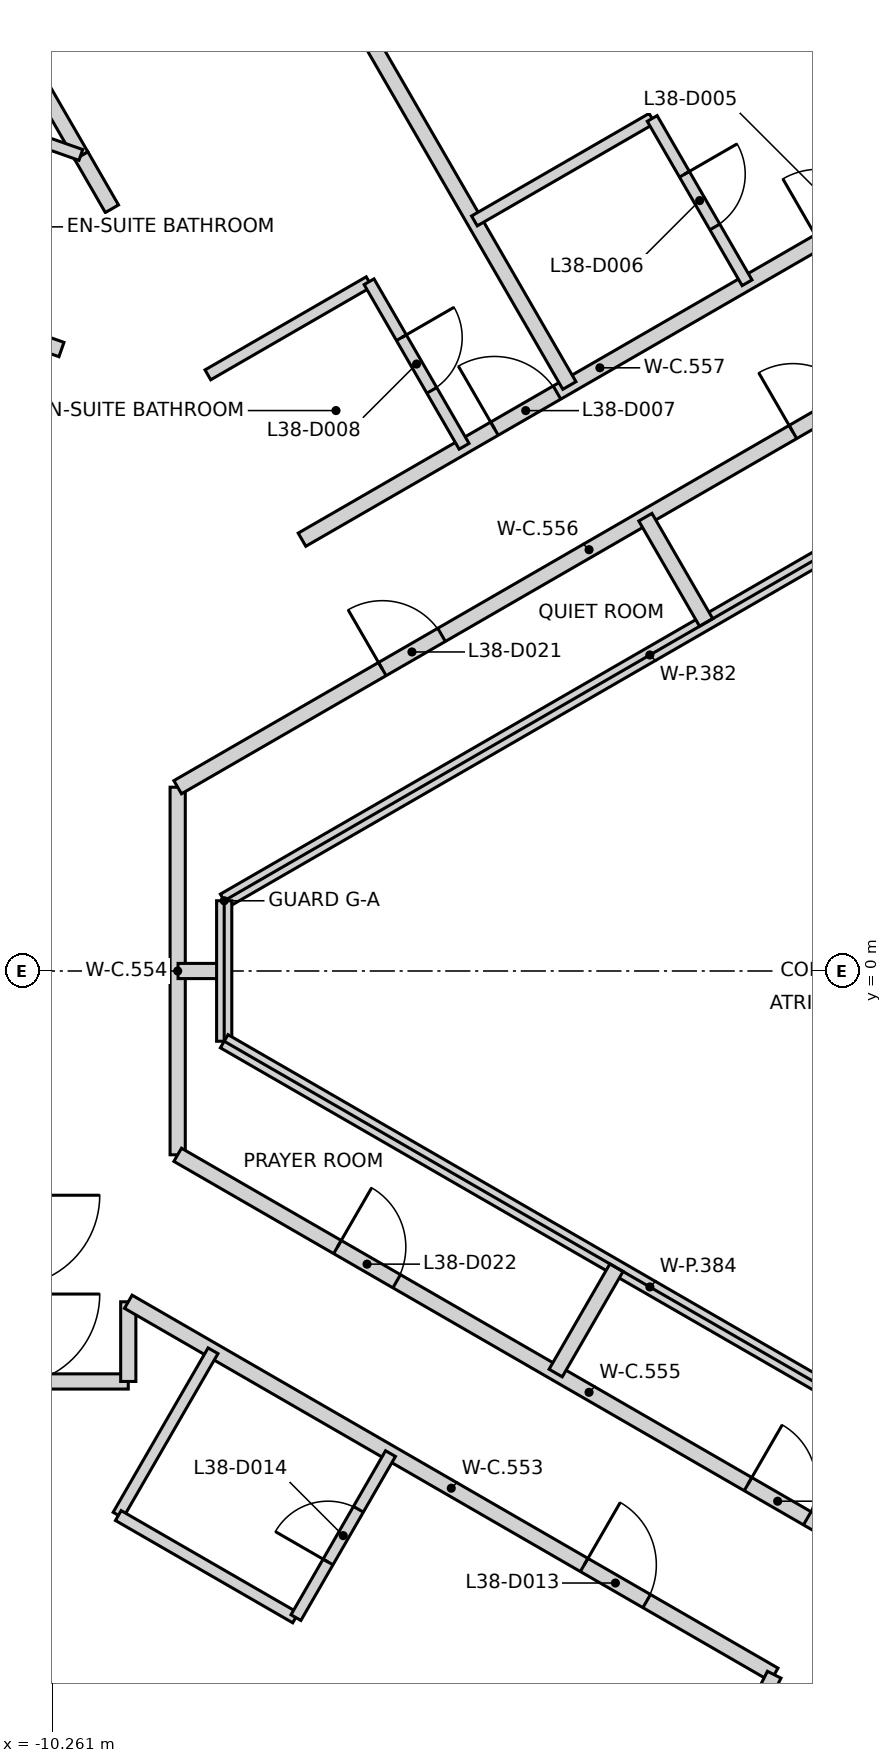
"""IFC4 building model, lengths in metres.
Left out: names, types, materials, properties, quantities, classifications, styles, units other than length and angle.
Written with IfcOpenShell. Run it as: python <this file> out.ifc"""

import sys

from ifc_helpers import new_model, si_unit, direction, frame, frame_2d, origin, place, context, subcontext, project, spatial, rectangle, extrude, element, fill, save


model = new_model("IFC4")
c1 = context("Model", 3, precision=1e-05, world=origin(), true_north=direction((0.0, 1.0)))
c2 = subcontext(c1, "Body", "Model", "MODEL_VIEW")
j1 = project(units=[si_unit("LENGTHUNIT", "METRE"), si_unit("PLANEANGLEUNIT", "RADIAN")], contexts=[c1])
p1 = place(None, origin())
s1 = spatial("IfcSite", under=j1, at=p1, CompositionType="ELEMENT")
p2 = place(p1, origin())
s2 = spatial("IfcBuilding", under=s1, at=p2, CompositionType="ELEMENT")
p3 = place(p2, frame((0.0, 0.0, 154.0)))
s3 = spatial("IfcBuildingStorey", under=s2, at=p3, CompositionType="ELEMENT", Elevation=154.0)
p4 = place(p3, frame((-16.026, 10.246, 0.0), z_axis=(0.0, 0.0, 1.0), x_axis=(0.943337348352, -0.331835271187, 0.0)))
e1 = element("IfcWall", 1, at=p4, inside=s3, PredefinedType="PARTITIONING", context=c2, shape_type="SweptSolid", body=[
    extrude(rectangle(XDim=6.238, YDim=0.2, at=frame_2d((3.119, 0.0))), origin(), (0.0, 0.0, 1.0), 3.2),
])
p5 = place(p4, frame((0.2, 0.0, 0.0)))
e2 = element("IfcOpeningElement", 2, at=p5, cuts=e1, PredefinedType="OPENING", context=c2, shape_type="SweptSolid", body=[
    extrude(rectangle(XDim=0.95, YDim=2.1, at=frame_2d((0.475, 1.05))), frame((0.0, 0.11, 0.0), z_axis=(0.0, -1.0, 0.0), x_axis=(1.0, 0.0, 0.0)), (0.0, 0.0, 1.0), 0.22),
])
p6 = place(p3, frame((-10.652, -5.4, 0.0), z_axis=(0.0, 0.0, 1.0), x_axis=(1.0, 0.0, 0.0)))
e3 = element("IfcWall", 3, at=p6, inside=s3, PredefinedType="PARTITIONING", context=c2, shape_type="SweptSolid", body=[
    extrude(rectangle(XDim=1.39, YDim=0.2, at=frame_2d((0.695, 0.0))), origin(), (0.0, 0.0, 1.0), 3.2),
])
p7 = place(p3, frame((-9.262, -5.4, 0.0), z_axis=(0.0, 0.0, 1.0), x_axis=(0.0, 1.0, 0.0)))
e4 = element("IfcWall", 4, at=p7, inside=s3, PredefinedType="PARTITIONING", context=c2, shape_type="SweptSolid", body=[
    extrude(rectangle(XDim=1.048, YDim=0.2, at=frame_2d((0.524, 0.0))), origin(), (0.0, 0.0, 1.0), 3.2),
])
p8 = place(p3, frame((-9.261, -4.351, 0.0), z_axis=(0.0, 0.0, 1.0), x_axis=(0.865985037707, -0.500069909581, 0.0)))
e5 = element("IfcWall", 5, at=p8, inside=s3, PredefinedType="PARTITIONING", context=c2, shape_type="SweptSolid", body=[
    extrude(rectangle(XDim=9.812, YDim=0.2, at=frame_2d((4.906, 0.0))), origin(), (0.0, 0.0, 1.0), 3.2),
])
p9 = place(p8, frame((6.925, 0.0, 0.0)))
e6 = element("IfcOpeningElement", 6, at=p9, cuts=e5, PredefinedType="OPENING", context=c2, shape_type="SweptSolid", body=[
    extrude(rectangle(XDim=0.95, YDim=2.1, at=frame_2d((0.475, 1.05))), frame((0.0, 0.11, 0.0), z_axis=(0.0, -1.0, 0.0), x_axis=(1.0, 0.0, 0.0)), (0.0, 0.0, 1.0), 0.22),
])
p10 = place(p3, frame((-8.612, -2.418, 0.0), z_axis=(0.0, 0.0, 1.0), x_axis=(0.0, 1.0, 0.0)))
e7 = element("IfcWall", 7, at=p10, inside=s3, PredefinedType="PARTITIONING", context=c2, shape_type="SweptSolid", body=[
    extrude(rectangle(XDim=4.836, YDim=0.2, at=frame_2d((2.418, 0.0))), origin(), (0.0, 0.0, 1.0), 2.3),
])
p11 = place(p3, frame((-8.612, -2.418, 0.0), z_axis=(0.0, 0.0, 1.0), x_axis=(0.866023916678, -0.500002575735, 0.0)))
e8 = element("IfcWall", 8, at=p11, inside=s3, PredefinedType="PARTITIONING", context=c2, shape_type="SweptSolid", body=[
    extrude(rectangle(XDim=12.499, YDim=0.2, at=frame_2d((6.249, 0.0))), origin(), (0.0, 0.0, 1.0), 3.2),
])
p12 = place(p11, frame((2.427, 0.0, 0.0)))
e9 = element("IfcOpeningElement", 9, at=p12, cuts=e8, PredefinedType="OPENING", context=c2, shape_type="SweptSolid", body=[
    extrude(rectangle(XDim=0.9, YDim=2.1, at=frame_2d((0.45, 1.05))), frame((0.0, 0.11, 0.0), z_axis=(0.0, -1.0, 0.0), x_axis=(1.0, 0.0, 0.0)), (0.0, 0.0, 1.0), 0.22),
])
p13 = place(p11, frame((8.665, 0.0, 0.0)))
e10 = element("IfcOpeningElement", 10, at=p13, cuts=e8, PredefinedType="OPENING", context=c2, shape_type="SweptSolid", body=[
    extrude(rectangle(XDim=0.9, YDim=2.1, at=frame_2d((0.45, 1.05))), frame((0.0, 0.11, 0.0), z_axis=(0.0, -1.0, 0.0), x_axis=(1.0, 0.0, 0.0)), (0.0, 0.0, 1.0), 0.22),
])
p14 = place(p3, frame((-8.612, 2.418, 0.0), z_axis=(0.0, 0.0, 1.0), x_axis=(0.866019033094, 0.500011034197, 0.0)))
e11 = element("IfcWall", 11, at=p14, inside=s3, PredefinedType="PARTITIONING", context=c2, shape_type="SweptSolid", body=[
    extrude(rectangle(XDim=12.498, YDim=0.2, at=frame_2d((6.249, 0.0))), origin(), (0.0, 0.0, 1.0), 3.2),
])
p15 = place(p14, frame((9.346, 0.0, 0.0)))
e12 = element("IfcOpeningElement", 12, at=p15, cuts=e11, PredefinedType="OPENING", context=c2, shape_type="SweptSolid", body=[
    extrude(rectangle(XDim=0.9, YDim=2.1, at=frame_2d((0.45, 1.05))), frame((0.0, 0.11, 0.0), z_axis=(0.0, -1.0, 0.0), x_axis=(1.0, 0.0, 0.0)), (0.0, 0.0, 1.0), 0.22),
])
p16 = place(p14, frame((3.109, 0.0, 0.0)))
e13 = element("IfcOpeningElement", 13, at=p16, cuts=e11, PredefinedType="OPENING", context=c2, shape_type="SweptSolid", body=[
    extrude(rectangle(XDim=0.9, YDim=2.1, at=frame_2d((0.45, 1.05))), frame((0.0, 0.11, 0.0), z_axis=(0.0, -1.0, 0.0), x_axis=(1.0, 0.0, 0.0)), (0.0, 0.0, 1.0), 0.22),
])
p17 = place(p3, frame((-6.976, 5.674, 0.0), z_axis=(0.0, 0.0, 1.0), x_axis=(0.8661469583, 0.499789402276, 0.0)))
e14 = element("IfcWall", 14, at=p17, inside=s3, PredefinedType="PARTITIONING", context=c2, shape_type="SweptSolid", body=[
    extrude(rectangle(XDim=9.05, YDim=0.2, at=frame_2d((4.525, 0.0))), origin(), (0.0, 0.0, 1.0), 3.2),
])
p18 = place(p17, frame((7.852, 0.0, 0.0)))
e15 = element("IfcOpeningElement", 15, at=p18, cuts=e14, PredefinedType="OPENING", context=c2, shape_type="SweptSolid", body=[
    extrude(rectangle(XDim=0.95, YDim=2.1, at=frame_2d((0.475, 1.05))), frame((0.0, 0.11, 0.0), z_axis=(0.0, -1.0, 0.0), x_axis=(1.0, 0.0, 0.0)), (0.0, 0.0, 1.0), 0.22),
])
p19 = place(p17, frame((2.923, 0.0, 0.0)))
e16 = element("IfcOpeningElement", 16, at=p19, cuts=e14, PredefinedType="OPENING", context=c2, shape_type="SweptSolid", body=[
    extrude(rectangle(XDim=0.95, YDim=2.1, at=frame_2d((0.475, 1.05))), frame((0.0, 0.11, 0.0), z_axis=(0.0, -1.0, 0.0), x_axis=(1.0, 0.0, 0.0)), (0.0, 0.0, 1.0), 0.22),
])
p20 = place(p3, frame((-2.162, -12.041, 0.0), z_axis=(0.0, 0.0, 1.0), x_axis=(0.448937335771, 0.893563242614, 0.0)))
e17 = element("IfcWall", 17, at=p20, inside=s3, PredefinedType="PARTITIONING", context=c2, shape_type="SweptSolid", body=[
    extrude(rectangle(XDim=3.115, YDim=0.2, at=frame_2d((1.557, 0.0))), origin(), (0.0, 0.0, 1.0), 3.2),
])
p21 = place(p3, frame((-13.573, 17.122, 0.0), z_axis=(0.0, 0.0, 1.0), x_axis=(0.49998952864, -0.866031449343, 0.0)))
e18 = element("IfcWall", 18, at=p21, inside=s3, PredefinedType="PARTITIONING", context=c2, shape_type="SweptSolid", body=[
    extrude(rectangle(XDim=7.385, YDim=0.2, at=frame_2d((3.693, 0.0))), origin(), (0.0, 0.0, 1.0), 2.3),
])
p22 = place(p3, frame((-10.071, 19.158, 0.0), z_axis=(0.0, 0.0, 1.0), x_axis=(0.499905140254, -0.866080164158, 0.0)))
e19 = element("IfcWall", 19, at=p22, inside=s3, PredefinedType="PARTITIONING", context=c2, shape_type="SweptSolid", body=[
    extrude(rectangle(XDim=13.227, YDim=0.2, at=frame_2d((6.613, 0.0))), origin(), (0.0, 0.0, 1.0), 2.3),
])
p23 = place(p3, frame((-9.88, 10.726, 0.0), z_axis=(0.0, 0.0, 1.0), x_axis=(0.499626274598, -0.866241066754, 0.0)))
e20 = element("IfcWall", 20, at=p23, inside=s3, PredefinedType="PARTITIONING", context=c2, shape_type="SweptSolid", body=[
    extrude(rectangle(XDim=0.806, YDim=0.2, at=frame_2d((0.403, 0.0))), origin(), (0.0, 0.0, 1.0), 3.2),
])
p24 = place(p3, frame((-8.607, 0.0, 0.0), z_axis=(0.0, 0.0, 1.0), x_axis=(1.0, 0.0, 0.0)))
e21 = element("IfcWall", 21, at=p24, inside=s3, PredefinedType="PARTITIONING", context=c2, shape_type="SweptSolid", body=[
    extrude(rectangle(XDim=0.607, YDim=0.2, at=frame_2d((0.303, 0.0))), origin(), (0.0, 0.0, 1.0), 2.3),
])
p25 = place(p3, frame((-8.0, 0.925, 0.0), z_axis=(0.0, 0.0, 1.0), x_axis=(0.866075250037, 0.499913653818, 0.0)))
e22 = element("IfcWall", 22, at=p25, inside=s3, PredefinedType="PARTITIONING", context=c2, shape_type="SweptSolid", body=[
    extrude(rectangle(XDim=12.932, YDim=0.2, at=frame_2d((6.466, 0.0))), origin(), (0.0, 0.0, 1.0), 2.3),
])
p26 = place(p3, frame((-8.0, -0.924, 0.0), z_axis=(0.0, 0.0, 1.0), x_axis=(0.0, 1.0, 0.0)))
e23 = element("IfcWall", 23, at=p26, inside=s3, PredefinedType="PARTITIONING", context=c2, shape_type="SweptSolid", body=[
    extrude(rectangle(XDim=1.848, YDim=0.2, at=frame_2d((0.924, 0.0))), origin(), (0.0, 0.0, 1.0), 2.3),
])
p27 = place(p3, frame((-8.0, -0.924, 0.0), z_axis=(0.0, 0.0, 1.0), x_axis=(0.866062358179, -0.499935987647, 0.0)))
e24 = element("IfcWall", 24, at=p27, inside=s3, PredefinedType="PARTITIONING", context=c2, shape_type="SweptSolid", body=[
    extrude(rectangle(XDim=12.932, YDim=0.2, at=frame_2d((6.466, 0.0))), origin(), (0.0, 0.0, 1.0), 2.3),
])
p28 = place(p3, frame((-3.639, -5.289, 0.0), z_axis=(0.0, 0.0, 1.0), x_axis=(0.49981490623, 0.866132241352, 0.0)))
e25 = element("IfcWall", 25, at=p28, inside=s3, PredefinedType="PARTITIONING", context=c2, shape_type="SweptSolid", body=[
    extrude(rectangle(XDim=1.6, YDim=0.2, at=frame_2d((0.8, 0.0))), origin(), (0.0, 0.0, 1.0), 2.3),
])
p29 = place(p3, frame((-2.459, 5.97, 0.0), z_axis=(0.0, 0.0, 1.0), x_axis=(0.499898632315, -0.866083920535, 0.0)))
e26 = element("IfcWall", 26, at=p29, inside=s3, PredefinedType="PARTITIONING", context=c2, shape_type="SweptSolid", body=[
    extrude(rectangle(XDim=1.599, YDim=0.2, at=frame_2d((0.8, 0.0))), origin(), (0.0, 0.0, 1.0), 3.2),
])
p30 = place(p3, frame((-11.858, 11.431, 0.0), z_axis=(0.0, 0.0, 1.0), x_axis=(0.943162669368, -0.332331429617, 0.0)))
e27 = element("IfcWall", 27, at=p30, inside=s3, PredefinedType="PARTITIONING", context=c2, shape_type="SweptSolid", body=[
    extrude(rectangle(XDim=2.091, YDim=0.15, at=frame_2d((1.045, 0.0))), origin(), (0.0, 0.0, 1.0), 3.2),
])
p31 = place(p3, frame((-9.396, -7.159, 0.0), z_axis=(0.0, 0.0, 1.0), x_axis=(0.500091929049, 0.865972322018, 0.0)))
e28 = element("IfcWall", 28, at=p31, inside=s3, PredefinedType="PARTITIONING", context=c2, shape_type="SweptSolid", body=[
    extrude(rectangle(XDim=2.498, YDim=0.15, at=frame_2d((1.249, 0.0))), origin(), (0.0, 0.0, 1.0), 3.2),
])
p32 = place(p3, frame((-9.393, -7.164, 0.0), z_axis=(0.0, 0.0, 1.0), x_axis=(0.866098020528, -0.499874203012, 0.0)))
e29 = element("IfcWall", 29, at=p32, inside=s3, PredefinedType="PARTITIONING", context=c2, shape_type="SweptSolid", body=[
    extrude(rectangle(XDim=2.693, YDim=0.15, at=frame_2d((1.346, 0.0))), origin(), (0.0, 0.0, 1.0), 3.2),
])
p33 = place(p3, frame((-8.215, 7.843, 0.0), z_axis=(0.0, 0.0, 1.0), x_axis=(0.865983065851, 0.500073324283, 0.0)))
e30 = element("IfcWall", 30, at=p33, inside=s3, PredefinedType="PARTITIONING", context=c2, shape_type="SweptSolid", body=[
    extrude(rectangle(XDim=2.449, YDim=0.15, at=frame_2d((1.225, 0.0))), origin(), (0.0, 0.0, 1.0), 3.2),
])
p34 = place(p3, frame((-7.056, -8.507, 0.0), z_axis=(0.0, 0.0, 1.0), x_axis=(0.499397145068, 0.866373182582, 0.0)))
e31 = element("IfcWall", 31, at=p34, inside=s3, PredefinedType="PARTITIONING", context=c2, shape_type="SweptSolid", body=[
    extrude(rectangle(XDim=2.491, YDim=0.15, at=frame_2d((1.245, 0.0))), origin(), (0.0, 0.0, 1.0), 3.2),
])
p35 = place(p34, frame((0.845, 0.0, 0.0)))
e32 = element("IfcOpeningElement", 32, at=p35, cuts=e31, PredefinedType="OPENING", context=c2, shape_type="SweptSolid", body=[
    extrude(rectangle(XDim=0.8, YDim=2.1, at=frame_2d((0.4, 1.05))), frame((0.0, 0.085, 0.0), z_axis=(0.0, -1.0, 0.0), x_axis=(1.0, 0.0, 0.0)), (0.0, 0.0, 1.0), 0.17),
])
p36 = place(p3, frame((-6.094, 9.068, 0.0), z_axis=(0.0, 0.0, 1.0), x_axis=(0.500004234368, -0.866022959057, 0.0)))
e33 = element("IfcWall", 33, at=p36, inside=s3, PredefinedType="PARTITIONING", context=c2, shape_type="SweptSolid", body=[
    extrude(rectangle(XDim=2.5, YDim=0.15, at=frame_2d((1.25, 0.0))), origin(), (0.0, 0.0, 1.0), 3.2),
])
p37 = place(p36, frame((0.85, 0.0, 0.0)))
e34 = element("IfcOpeningElement", 34, at=p37, cuts=e33, PredefinedType="OPENING", context=c2, shape_type="SweptSolid", body=[
    extrude(rectangle(XDim=0.8, YDim=2.1, at=frame_2d((0.4, 1.05))), frame((0.0, 0.085, 0.0), z_axis=(0.0, -1.0, 0.0), x_axis=(1.0, 0.0, 0.0)), (0.0, 0.0, 1.0), 0.17),
])
p38 = place(p3, frame((-4.708, 9.868, 0.0), z_axis=(0.0, 0.0, 1.0), x_axis=(0.865950438779, 0.500129820725, 0.0)))
e35 = element("IfcWall", 35, at=p38, inside=s3, PredefinedType="PARTITIONING", context=c2, shape_type="SweptSolid", body=[
    extrude(rectangle(XDim=2.698, YDim=0.15, at=frame_2d((1.349, 0.0))), origin(), (0.0, 0.0, 1.0), 3.2),
])
p39 = place(p3, frame((-2.369, 11.216, 0.0), z_axis=(0.0, 0.0, 1.0), x_axis=(0.499852268047, -0.866110680068, 0.0)))
e36 = element("IfcWall", 36, at=p39, inside=s3, PredefinedType="PARTITIONING", context=c2, shape_type="SweptSolid", body=[
    extrude(rectangle(XDim=2.496, YDim=0.15, at=frame_2d((1.248, 0.0))), origin(), (0.0, 0.0, 1.0), 3.2),
])
p40 = place(p39, frame((0.848, 0.0, 0.0)))
e37 = element("IfcOpeningElement", 37, at=p40, cuts=e36, PredefinedType="OPENING", context=c2, shape_type="SweptSolid", body=[
    extrude(rectangle(XDim=0.8, YDim=2.1, at=frame_2d((0.4, 1.05))), frame((0.0, 0.085, 0.0), z_axis=(0.0, -1.0, 0.0), x_axis=(1.0, 0.0, 0.0)), (0.0, 0.0, 1.0), 0.17),
])
p41 = place(p40, origin())
e38 = element("IfcDoor", 38, at=p41, inside=s3, OperationType="SINGLE_SWING_LEFT", PredefinedType="DOOR", context=c2, shape_type="SweptSolid", body=[
    extrude(rectangle(XDim=0.8, YDim=2.1, at=frame_2d((0.4, 1.05))), frame((0.0, 0.025, 0.0), z_axis=(0.0, -1.0, 0.0), x_axis=(1.0, 0.0, 0.0)), (0.0, 0.0, 1.0), 0.05),
])
fill(e37, e38)
p42 = place(p19, origin())
e39 = element("IfcDoor", 39, at=p42, inside=s3, OperationType="SINGLE_SWING_LEFT", PredefinedType="DOOR", context=c2, shape_type="SweptSolid", body=[
    extrude(rectangle(XDim=0.95, YDim=2.1, at=frame_2d((0.475, 1.05))), frame((0.0, 0.025, 0.0), z_axis=(0.0, -1.0, 0.0), x_axis=(1.0, 0.0, 0.0)), (0.0, 0.0, 1.0), 0.05),
])
fill(e16, e39)
p43 = place(p37, frame((0.8, 0.0, 0.0), z_axis=(0.0, 0.0, 1.0), x_axis=(-1.0, 0.0, 0.0)))
e40 = element("IfcDoor", 40, at=p43, inside=s3, OperationType="SINGLE_SWING_LEFT", PredefinedType="DOOR", context=c2, shape_type="SweptSolid", body=[
    extrude(rectangle(XDim=0.8, YDim=2.1, at=frame_2d((0.4, 1.05))), frame((0.0, 0.025, 0.0), z_axis=(0.0, -1.0, 0.0), x_axis=(1.0, 0.0, 0.0)), (0.0, 0.0, 1.0), 0.05),
])
fill(e34, e40)
p44 = place(p9, frame((0.95, 0.0, 0.0), z_axis=(0.0, 0.0, 1.0), x_axis=(-1.0, 0.0, 0.0)))
e41 = element("IfcDoor", 41, at=p44, inside=s3, OperationType="SINGLE_SWING_LEFT", PredefinedType="DOOR", context=c2, shape_type="SweptSolid", body=[
    extrude(rectangle(XDim=0.95, YDim=2.1, at=frame_2d((0.475, 1.05))), frame((0.0, 0.025, 0.0), z_axis=(0.0, -1.0, 0.0), x_axis=(1.0, 0.0, 0.0)), (0.0, 0.0, 1.0), 0.05),
])
fill(e6, e41)
p45 = place(p35, origin())
e42 = element("IfcDoor", 42, at=p45, inside=s3, OperationType="SINGLE_SWING_LEFT", PredefinedType="DOOR", context=c2, shape_type="SweptSolid", body=[
    extrude(rectangle(XDim=0.8, YDim=2.1, at=frame_2d((0.4, 1.05))), frame((0.0, 0.025, 0.0), z_axis=(0.0, -1.0, 0.0), x_axis=(1.0, 0.0, 0.0)), (0.0, 0.0, 1.0), 0.05),
])
fill(e32, e42)
p46 = place(p15, frame((0.9, 0.0, 0.0), z_axis=(0.0, 0.0, 1.0), x_axis=(-1.0, 0.0, 0.0)))
e43 = element("IfcDoor", 43, at=p46, inside=s3, OperationType="SINGLE_SWING_LEFT", PredefinedType="DOOR", context=c2, shape_type="SweptSolid", body=[
    extrude(rectangle(XDim=0.9, YDim=2.1, at=frame_2d((0.45, 1.05))), frame((0.0, 0.025, 0.0), z_axis=(0.0, -1.0, 0.0), x_axis=(1.0, 0.0, 0.0)), (0.0, 0.0, 1.0), 0.05),
])
fill(e12, e43)
p47 = place(p16, frame((0.9, 0.0, 0.0), z_axis=(0.0, 0.0, 1.0), x_axis=(-1.0, 0.0, 0.0)))
e44 = element("IfcDoor", 44, at=p47, inside=s3, OperationType="SINGLE_SWING_LEFT", PredefinedType="DOOR", context=c2, shape_type="SweptSolid", body=[
    extrude(rectangle(XDim=0.9, YDim=2.1, at=frame_2d((0.45, 1.05))), frame((0.0, 0.025, 0.0), z_axis=(0.0, -1.0, 0.0), x_axis=(1.0, 0.0, 0.0)), (0.0, 0.0, 1.0), 0.05),
])
fill(e13, e44)
p48 = place(p12, origin())
e45 = element("IfcDoor", 45, at=p48, inside=s3, OperationType="SINGLE_SWING_LEFT", PredefinedType="DOOR", context=c2, shape_type="SweptSolid", body=[
    extrude(rectangle(XDim=0.9, YDim=2.1, at=frame_2d((0.45, 1.05))), frame((0.0, 0.025, 0.0), z_axis=(0.0, -1.0, 0.0), x_axis=(1.0, 0.0, 0.0)), (0.0, 0.0, 1.0), 0.05),
])
fill(e9, e45)
p49 = place(p13, origin())
e46 = element("IfcDoor", 46, at=p49, inside=s3, OperationType="SINGLE_SWING_LEFT", PredefinedType="DOOR", context=c2, shape_type="SweptSolid", body=[
    extrude(rectangle(XDim=0.9, YDim=2.1, at=frame_2d((0.45, 1.05))), frame((0.0, 0.025, 0.0), z_axis=(0.0, -1.0, 0.0), x_axis=(1.0, 0.0, 0.0)), (0.0, 0.0, 1.0), 0.05),
])
fill(e10, e46)
save(model, sys.argv[1])
